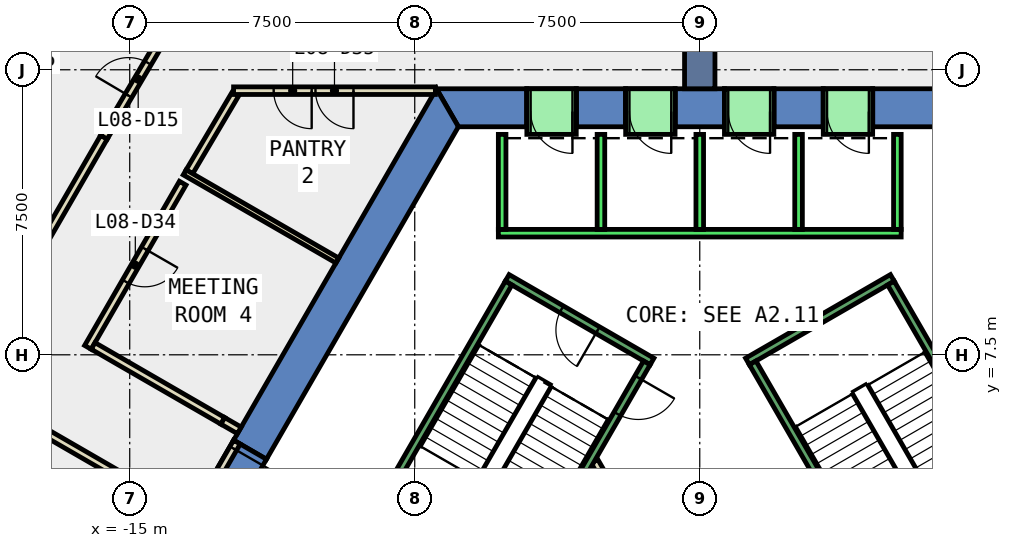
"""IFC4 building model, lengths in metres.
Left out: names, types, materials, properties, quantities, classifications, styles, units other than length and angle.
Written with IfcOpenShell. Run it as: python <this file> out.ifc"""

import sys

from ifc_helpers import new_model, si_unit, direction, frame, frame_2d, origin, place, context, subcontext, project, spatial, polyline, rectangle, outline, extrude, element, fill, save


model = new_model("IFC4")
c1 = context("Model", 3, precision=1e-05, world=origin(), true_north=direction((0.0, 1.0)))
c2 = subcontext(c1, "Body", "Model", "MODEL_VIEW")
j1 = project(units=[si_unit("LENGTHUNIT", "METRE"), si_unit("PLANEANGLEUNIT", "RADIAN")], contexts=[c1])
p1 = place(None, origin())
s1 = spatial("IfcSite", under=j1, at=p1, CompositionType="ELEMENT")
p2 = place(p1, origin())
s2 = spatial("IfcBuilding", under=s1, at=p2, CompositionType="ELEMENT")
p3 = place(p2, frame((0.0, 0.0, 43.4)))
s3 = spatial("IfcBuildingStorey", under=s2, at=p3, CompositionType="ELEMENT", Elevation=43.4)
p4 = place(p3, frame((0.0, 0.0, -0.4)))
e1 = element("IfcWall", 1, at=p4, inside=s3, PredefinedType="SHEAR", context=c2, shape_type="SweptSolid", body=[
    extrude(outline(polyline([(4.55, 14.5), (4.55, 13.5), (6.351, 13.5), (6.928, 14.5), (4.55, 14.5)])), origin(), (0.0, 0.0, 1.0), 4.2),
])
p5 = place(p3, frame((0.0, 0.0, -0.4)))
e2 = element("IfcWall", 2, at=p5, inside=s3, PredefinedType="SHEAR", context=c2, shape_type="SweptSolid", body=[
    extrude(outline(polyline([(1.95, 14.5), (1.95, 13.5), (3.25, 13.5), (3.25, 14.5), (1.95, 14.5)])), origin(), (0.0, 0.0, 1.0), 4.2),
])
p6 = place(p3, frame((0.0, 0.0, -0.4)))
e3 = element("IfcWall", 3, at=p6, inside=s3, PredefinedType="SHEAR", context=c2, shape_type="SweptSolid", body=[
    extrude(outline(polyline([(-0.65, 14.5), (-0.65, 13.5), (0.65, 13.5), (0.65, 14.5), (-0.65, 14.5)])), origin(), (0.0, 0.0, 1.0), 4.2),
])
p7 = place(p3, frame((0.0, 0.0, -0.4)))
e4 = element("IfcWall", 4, at=p7, inside=s3, PredefinedType="SHEAR", context=c2, shape_type="SweptSolid", body=[
    extrude(outline(polyline([(-3.25, 14.5), (-3.25, 13.5), (-1.95, 13.5), (-1.95, 14.5), (-3.25, 14.5)])), origin(), (0.0, 0.0, 1.0), 4.2),
])
p8 = place(p3, frame((0.0, 0.0, -0.4)))
e5 = element("IfcWall", 5, at=p8, inside=s3, PredefinedType="SHEAR", context=c2, shape_type="SweptSolid", body=[
    extrude(outline(polyline([(-4.55, 13.5), (-4.55, 14.5), (-6.928, 14.5), (-6.351, 13.5), (-4.55, 13.5)])), origin(), (0.0, 0.0, 1.0), 4.2),
])
p9 = place(p3, frame((0.0, 0.0, 3.6)))
e6 = element("IfcWall", 6, at=p9, inside=s3, PredefinedType="SHEAR", context=c2, shape_type="SweptSolid", body=[
    extrude(outline(polyline([(3.25, 14.5), (3.25, 13.5), (4.55, 13.5), (4.55, 14.5), (3.25, 14.5)])), origin(), (0.0, 0.0, 1.0), 0.2),
])
p10 = place(p3, frame((0.0, 0.0, 3.6)))
e7 = element("IfcWall", 7, at=p10, inside=s3, PredefinedType="SHEAR", context=c2, shape_type="SweptSolid", body=[
    extrude(outline(polyline([(0.65, 14.5), (0.65, 13.5), (1.95, 13.5), (1.95, 14.5), (0.65, 14.5)])), origin(), (0.0, 0.0, 1.0), 0.2),
])
p11 = place(p3, frame((0.0, 0.0, 3.6)))
e8 = element("IfcWall", 8, at=p11, inside=s3, PredefinedType="SHEAR", context=c2, shape_type="SweptSolid", body=[
    extrude(outline(polyline([(-1.95, 14.5), (-1.95, 13.5), (-0.65, 13.5), (-0.65, 14.5), (-1.95, 14.5)])), origin(), (0.0, 0.0, 1.0), 0.2),
])
p12 = place(p3, frame((0.0, 0.0, 3.6)))
e9 = element("IfcWall", 9, at=p12, inside=s3, PredefinedType="SHEAR", context=c2, shape_type="SweptSolid", body=[
    extrude(outline(polyline([(-4.55, 14.5), (-4.55, 13.5), (-3.25, 13.5), (-3.25, 14.5), (-4.55, 14.5)])), origin(), (0.0, 0.0, 1.0), 0.2),
])
p13 = place(p3, frame((0.0, 0.0, -0.4)))
e10 = element("IfcWall", 10, at=p13, inside=s3, PredefinedType="SHEAR", context=c2, shape_type="SweptSolid", body=[
    extrude(outline(polyline([(-12.267, 5.252), (-11.402, 4.752), (-6.351, 13.5), (-6.928, 14.5), (-12.267, 5.252)])), origin(), (0.0, 0.0, 1.0), 4.2),
])
p14 = place(p3, frame((0.0, 0.0, 3.6)))
e11 = element("IfcWall", 11, at=p14, inside=s3, PredefinedType="SHEAR", context=c2, shape_type="SweptSolid", body=[
    extrude(outline(polyline([(-13.267, 3.52), (-12.402, 3.02), (-11.402, 4.752), (-12.267, 5.252), (-13.267, 3.52)])), origin(), (0.0, 0.0, 1.0), 0.2),
])
p15 = place(p3, frame((0.0, 14.5, -0.4), z_axis=(0.0, 0.0, 1.0), x_axis=(0.0, 1.0, 0.0)))
e12 = element("IfcWall", 12, at=p15, inside=s3, PredefinedType="SHEAR", context=c2, shape_type="SweptSolid", body=[
    extrude(rectangle(XDim=9.0, YDim=0.8, at=frame_2d((4.5, 0.0))), origin(), (0.0, 0.0, 1.0), 4.2),
])
p16 = place(p3, frame((-13.606, 12.016, 0.0), z_axis=(0.0, 0.0, 1.0), x_axis=(-0.499992180995, -0.866029918042, 0.0)))
e13 = element("IfcWall", 13, at=p16, inside=s3, PredefinedType="PARTITIONING", context=c2, shape_type="SweptSolid", body=[
    extrude(rectangle(XDim=4.988, YDim=0.2, at=frame_2d((2.494, 0.0))), origin(), (0.0, 0.0, 1.0), 3.8),
])
p17 = place(p16, frame((1.994, 0.0, 0.0)))
e14 = element("IfcOpeningElement", 14, at=p17, cuts=e13, PredefinedType="OPENING", context=c2, shape_type="SweptSolid", body=[
    extrude(rectangle(XDim=1.0, YDim=2.1, at=frame_2d((0.5, 1.05))), frame((0.0, 0.11, 0.0), z_axis=(0.0, -1.0, 0.0), x_axis=(1.0, 0.0, 0.0)), (0.0, 0.0, 1.0), 0.22),
])
p18 = place(p3, frame((-15.963, 7.733, 0.0), z_axis=(0.0, 0.0, 1.0), x_axis=(0.865965832374, -0.500103166518, 0.0)))
e15 = element("IfcWall", 15, at=p18, inside=s3, PredefinedType="PARTITIONING", context=c2, shape_type="SweptSolid", body=[
    extrude(rectangle(XDim=3.941, YDim=0.2, at=frame_2d((1.971, 0.0))), origin(), (0.0, 0.0, 1.0), 3.8),
])
p19 = place(p3, frame((-12.218, 14.364, 0.0), z_axis=(0.0, 0.0, 1.0), x_axis=(-0.508767325294, -0.860904064756, 0.0)))
e16 = element("IfcWall", 16, at=p19, inside=s3, PredefinedType="PARTITIONING", context=c2, shape_type="SweptSolid", body=[
    extrude(rectangle(XDim=2.38, YDim=0.2, at=frame_2d((1.19, 0.0))), origin(), (0.0, 0.0, 1.0), 3.8),
])
p20 = place(p3, frame((-17.261, 5.48, 0.0), z_axis=(0.0, 0.0, 1.0), x_axis=(0.865949187497, -0.500131987253, 0.0)))
e17 = element("IfcWall", 17, at=p20, inside=s3, PredefinedType="PARTITIONING", context=c2, shape_type="SweptSolid", body=[
    extrude(rectangle(XDim=3.939, YDim=0.2, at=frame_2d((1.969, 0.0))), origin(), (0.0, 0.0, 1.0), 3.8),
])
p21 = place(p3, frame((-17.448, 10.16, 0.0), z_axis=(0.0, 0.0, 1.0), x_axis=(0.499951278228, 0.866053531485, 0.0)))
e18 = element("IfcWall", 18, at=p21, inside=s3, PredefinedType="PARTITIONING", context=c2, shape_type="SweptSolid", body=[
    extrude(rectangle(XDim=3.54, YDim=0.2, at=frame_2d((1.77, 0.0))), origin(), (0.0, 0.0, 1.0), 3.8),
])
p22 = place(p3, frame((-15.678, 13.226, 0.0), z_axis=(0.0, 0.0, 1.0), x_axis=(0.508613166028, 0.860995149431, 0.0)))
e19 = element("IfcWall", 19, at=p22, inside=s3, PredefinedType="PARTITIONING", context=c2, shape_type="SweptSolid", body=[
    extrude(rectangle(XDim=3.541, YDim=0.2, at=frame_2d((1.771, 0.0))), origin(), (0.0, 0.0, 1.0), 3.8),
])
p23 = place(p22, frame((1.271, 0.0, 0.0)))
e20 = element("IfcOpeningElement", 20, at=p23, cuts=e19, PredefinedType="OPENING", context=c2, shape_type="SweptSolid", body=[
    extrude(rectangle(XDim=1.0, YDim=2.1, at=frame_2d((0.5, 1.05))), frame((0.0, 0.11, 0.0), z_axis=(0.0, -1.0, 0.0), x_axis=(1.0, 0.0, 0.0)), (0.0, 0.0, 1.0), 0.22),
])
p24 = place(p3, frame((-13.554, 12.3, 0.0), z_axis=(0.0, 0.0, 1.0), x_axis=(0.866028685375, -0.499994316075, 0.0)))
e21 = element("IfcWall", 21, at=p24, inside=s3, PredefinedType="PARTITIONING", context=c2, shape_type="SweptSolid", body=[
    extrude(rectangle(XDim=4.638, YDim=0.15, at=frame_2d((2.319, 0.0))), origin(), (0.0, 0.0, 1.0), 3.8),
])
p25 = place(p3, frame((-6.957, 14.45, 0.0), z_axis=(0.0, 0.0, 1.0), x_axis=(-1.0, 0.0, 0.0)))
e22 = element("IfcWall", 22, at=p25, inside=s3, PredefinedType="PARTITIONING", context=c2, shape_type="SweptSolid", body=[
    extrude(rectangle(XDim=5.31, YDim=0.2, at=frame_2d((2.655, 0.0))), origin(), (0.0, 0.0, 1.0), 3.8),
])
p26 = place(p25, frame((2.155, 0.0, 0.0)))
e23 = element("IfcOpeningElement", 23, at=p26, cuts=e22, PredefinedType="OPENING", context=c2, shape_type="SweptSolid", body=[
    extrude(rectangle(XDim=1.0, YDim=2.1, at=frame_2d((0.5, 1.05))), frame((0.0, 0.11, 0.0), z_axis=(0.0, -1.0, 0.0), x_axis=(1.0, 0.0, 0.0)), (0.0, 0.0, 1.0), 0.22),
])
p27 = place(p25, frame((3.255, 0.0, 0.0)))
e24 = element("IfcOpeningElement", 24, at=p27, cuts=e22, PredefinedType="OPENING", context=c2, shape_type="SweptSolid", body=[
    extrude(rectangle(XDim=1.0, YDim=2.1, at=frame_2d((0.5, 1.05))), frame((0.0, 0.11, 0.0), z_axis=(0.0, -1.0, 0.0), x_axis=(1.0, 0.0, 0.0)), (0.0, 0.0, 1.0), 0.22),
])
p28 = place(p3, frame((-2.771, 4.7, 0.0), z_axis=(0.0, 0.0, 1.0), x_axis=(0.499969479948, -0.866043023828, 0.0)))
e25 = element("IfcWall", 25, at=p28, inside=s3, PredefinedType="PARTITIONING", context=c2, shape_type="SweptSolid", body=[
    extrude(rectangle(XDim=4.99, YDim=0.2, at=frame_2d((2.495, 0.0))), origin(), (0.0, 0.0, 1.0), 3.8),
])
p29 = place(p28, frame((1.945, 0.0, 0.0)))
e26 = element("IfcOpeningElement", 26, at=p29, cuts=e25, PredefinedType="OPENING", context=c2, shape_type="SweptSolid", body=[
    extrude(rectangle(XDim=1.0, YDim=2.1, at=frame_2d((0.5, 1.05))), frame((0.0, 0.11, 0.0), z_axis=(0.0, -1.0, 0.0), x_axis=(1.0, 0.0, 0.0)), (0.0, 0.0, 1.0), 0.22),
])
p30 = place(p3, frame((-12.18, 5.202, 0.0), z_axis=(0.0, 0.0, 1.0), x_axis=(-0.50002537861, -0.866010750942, 0.0)))
e27 = element("IfcWall", 27, at=p30, inside=s3, PredefinedType="PARTITIONING", context=c2, shape_type="SweptSolid", body=[
    extrude(rectangle(XDim=2.0, YDim=0.2, at=frame_2d((1.0, 0.0))), origin(), (0.0, 0.0, 1.0), 2.4),
])
p31 = place(p30, frame((0.19, 0.0, 0.0)))
e28 = element("IfcOpeningElement", 28, at=p31, cuts=e27, PredefinedType="OPENING", context=c2, shape_type="SweptSolid", body=[
    extrude(rectangle(XDim=1.8, YDim=2.1, at=frame_2d((0.9, 1.05))), frame((0.0, 0.11, 0.0), z_axis=(0.0, -1.0, 0.0), x_axis=(1.0, 0.0, 0.0)), (0.0, 0.0, 1.0), 0.22),
])
p32 = place(p3, frame((-12.55, 5.762, 0.0), z_axis=(0.0, 0.0, 1.0), x_axis=(0.866071776036, -0.499919672301, 0.0)))
e29 = element("IfcWall", 29, at=p32, inside=s3, PredefinedType="PARTITIONING", context=c2, shape_type="SweptSolid", body=[
    extrude(rectangle(XDim=0.5, YDim=0.2, at=frame_2d((0.25, 0.0))), origin(), (0.0, 0.0, 1.0), 2.4),
])
p33 = place(p3, frame((5.3, 10.7, 0.0), z_axis=(0.0, 0.0, 1.0), x_axis=(-1.0, 0.0, 0.0)))
e30 = element("IfcWall", 30, at=p33, inside=s3, PredefinedType="STANDARD", context=c2, shape_type="SweptSolid", body=[
    extrude(rectangle(XDim=10.6, YDim=0.2, at=frame_2d((5.3, 0.0))), origin(), (0.0, 0.0, 1.0), 3.8),
])
for number, where, z_axis, x_axis in (
    (31, (5.2, 10.8, 0.0), (0.0, 0.0, 1.0), (0.0, 1.0, 0.0)),
    (32, (2.6, 10.8, 0.0), (0.0, 0.0, 1.0), (0.0, 1.0, 0.0)),
    (33, (0.0, 10.8, 0.0), (0.0, 0.0, 1.0), (0.0, 1.0, 0.0)),
    (34, (-2.6, 10.8, 0.0), (0.0, 0.0, 1.0), (0.0, 1.0, 0.0)),
    (35, (-5.2, 10.8, 0.0), (0.0, 0.0, 1.0), (0.0, 1.0, 0.0)),
):
    element("IfcWall", number, at=place(p3, frame(where, z_axis=z_axis, x_axis=x_axis)), inside=s3, PredefinedType="STANDARD", context=c2, shape_type="SweptSolid", body=[
        extrude(rectangle(XDim=2.5, YDim=0.2, at=frame_2d((1.25, 0.0))), origin(), (0.0, 0.0, 1.0), 3.8),
    ])
p34 = place(p3, frame((4.55, 13.9, 0.0), z_axis=(0.0, 0.0, 1.0), x_axis=(-1.0, 0.0, 0.0)))
e36 = element("IfcWall", 36, at=p34, inside=s3, PredefinedType="STANDARD", context=c2, shape_type="SweptSolid", body=[
    extrude(rectangle(XDim=1.3, YDim=1.2, at=frame_2d((0.65, 0.0))), origin(), (0.0, 0.0, 1.0), 2.4),
])
p35 = place(p34, frame((0.1, 0.0, 0.0)))
e37 = element("IfcOpeningElement", 37, at=p35, cuts=e36, PredefinedType="OPENING", context=c2, shape_type="SweptSolid", body=[
    extrude(rectangle(XDim=1.1, YDim=2.3, at=frame_2d((0.55, 1.15))), frame((0.0, 0.61, 0.0), z_axis=(0.0, -1.0, 0.0), x_axis=(1.0, 0.0, 0.0)), (0.0, 0.0, 1.0), 1.22),
])
p36 = place(p3, frame((1.95, 13.9, 0.0), z_axis=(0.0, 0.0, 1.0), x_axis=(-1.0, 0.0, 0.0)))
e38 = element("IfcWall", 38, at=p36, inside=s3, PredefinedType="STANDARD", context=c2, shape_type="SweptSolid", body=[
    extrude(rectangle(XDim=1.3, YDim=1.2, at=frame_2d((0.65, 0.0))), origin(), (0.0, 0.0, 1.0), 2.4),
])
p37 = place(p36, frame((0.1, 0.0, 0.0)))
e39 = element("IfcOpeningElement", 39, at=p37, cuts=e38, PredefinedType="OPENING", context=c2, shape_type="SweptSolid", body=[
    extrude(rectangle(XDim=1.1, YDim=2.3, at=frame_2d((0.55, 1.15))), frame((0.0, 0.61, 0.0), z_axis=(0.0, -1.0, 0.0), x_axis=(1.0, 0.0, 0.0)), (0.0, 0.0, 1.0), 1.22),
])
p38 = place(p3, frame((-0.65, 13.9, 0.0), z_axis=(0.0, 0.0, 1.0), x_axis=(-1.0, 0.0, 0.0)))
e40 = element("IfcWall", 40, at=p38, inside=s3, PredefinedType="STANDARD", context=c2, shape_type="SweptSolid", body=[
    extrude(rectangle(XDim=1.3, YDim=1.2, at=frame_2d((0.65, 0.0))), origin(), (0.0, 0.0, 1.0), 2.4),
])
p39 = place(p38, frame((0.1, 0.0, 0.0)))
e41 = element("IfcOpeningElement", 41, at=p39, cuts=e40, PredefinedType="OPENING", context=c2, shape_type="SweptSolid", body=[
    extrude(rectangle(XDim=1.1, YDim=2.3, at=frame_2d((0.55, 1.15))), frame((0.0, 0.61, 0.0), z_axis=(0.0, -1.0, 0.0), x_axis=(1.0, 0.0, 0.0)), (0.0, 0.0, 1.0), 1.22),
])
p40 = place(p3, frame((-3.25, 13.9, 0.0), z_axis=(0.0, 0.0, 1.0), x_axis=(-1.0, 0.0, 0.0)))
e42 = element("IfcWall", 42, at=p40, inside=s3, PredefinedType="STANDARD", context=c2, shape_type="SweptSolid", body=[
    extrude(rectangle(XDim=1.3, YDim=1.2, at=frame_2d((0.65, 0.0))), origin(), (0.0, 0.0, 1.0), 2.4),
])
p41 = place(p40, frame((0.1, 0.0, 0.0)))
e43 = element("IfcOpeningElement", 43, at=p41, cuts=e42, PredefinedType="OPENING", context=c2, shape_type="SweptSolid", body=[
    extrude(rectangle(XDim=1.1, YDim=2.3, at=frame_2d((0.55, 1.15))), frame((0.0, 0.61, 0.0), z_axis=(0.0, -1.0, 0.0), x_axis=(1.0, 0.0, 0.0)), (0.0, 0.0, 1.0), 1.22),
])
p42 = place(p3, frame((1.256, 7.324, 0.0), z_axis=(0.0, 0.0, 1.0), x_axis=(0.866046073146, 0.499964197906, 0.0)))
e44 = element("IfcWall", 44, at=p42, inside=s3, PredefinedType="STANDARD", context=c2, shape_type="SweptSolid", body=[
    extrude(rectangle(XDim=4.4, YDim=0.2, at=frame_2d((2.2, 0.0))), origin(), (0.0, 0.0, 1.0), 3.8),
])
p43 = place(p3, frame((4.843, 1.312, 0.0), z_axis=(0.0, 0.0, 1.0), x_axis=(-0.499963383562, 0.866046543262, 0.0)))
e45 = element("IfcWall", 45, at=p43, inside=s3, PredefinedType="STANDARD", context=c2, shape_type="SweptSolid", body=[
    extrude(rectangle(XDim=6.9, YDim=0.2, at=frame_2d((3.45, 0.0))), origin(), (0.0, 0.0, 1.0), 3.8),
])
p44 = place(p43, frame((0.45, 0.0, 0.0)))
e46 = element("IfcOpeningElement", 46, at=p44, cuts=e45, PredefinedType="OPENING", context=c2, shape_type="SweptSolid", body=[
    extrude(rectangle(XDim=1.1, YDim=2.2, at=frame_2d((0.55, 1.1))), frame((0.0, 0.11, 0.0), z_axis=(0.0, -1.0, 0.0), x_axis=(1.0, 0.0, 0.0)), (0.0, 0.0, 1.0), 0.22),
])
p45 = place(p3, frame((8.48, 3.412, 0.0), z_axis=(0.0, 0.0, 1.0), x_axis=(-0.499978703459, 0.866037698999, 0.0)))
e47 = element("IfcWall", 47, at=p45, inside=s3, PredefinedType="STANDARD", context=c2, shape_type="SweptSolid", body=[
    extrude(rectangle(XDim=6.9, YDim=0.2, at=frame_2d((3.45, 0.0))), origin(), (0.0, 0.0, 1.0), 3.8),
])
p46 = place(p3, frame((-1.256, 7.324, 0.0), z_axis=(0.0, 0.0, 1.0), x_axis=(-0.866046073146, 0.499964197906, 0.0)))
e48 = element("IfcWall", 48, at=p46, inside=s3, PredefinedType="STANDARD", context=c2, shape_type="SweptSolid", body=[
    extrude(rectangle(XDim=4.4, YDim=0.2, at=frame_2d((2.2, 0.0))), origin(), (0.0, 0.0, 1.0), 3.8),
])
p47 = place(p46, frame((1.65, 0.0, 0.0)))
e49 = element("IfcOpeningElement", 49, at=p47, cuts=e48, PredefinedType="OPENING", context=c2, shape_type="SweptSolid", body=[
    extrude(rectangle(XDim=1.1, YDim=2.2, at=frame_2d((0.55, 1.1))), frame((0.0, 0.11, 0.0), z_axis=(0.0, -1.0, 0.0), x_axis=(1.0, 0.0, 0.0)), (0.0, 0.0, 1.0), 0.22),
])
p48 = place(p3, frame((-1.393, 7.288, 0.0), z_axis=(0.0, 0.0, 1.0), x_axis=(-0.499963383562, -0.866046543262, 0.0)))
e50 = element("IfcWall", 50, at=p48, inside=s3, PredefinedType="STANDARD", context=c2, shape_type="SweptSolid", body=[
    extrude(rectangle(XDim=6.9, YDim=0.2, at=frame_2d((3.45, 0.0))), origin(), (0.0, 0.0, 1.0), 3.8),
])
p49 = place(p48, frame((0.45, 0.0, 0.0)))
e51 = element("IfcOpeningElement", 51, at=p49, cuts=e50, PredefinedType="OPENING", context=c2, shape_type="SweptSolid", body=[
    extrude(rectangle(XDim=1.1, YDim=2.2, at=frame_2d((0.55, 1.1))), frame((0.0, 0.11, 0.0), z_axis=(0.0, -1.0, 0.0), x_axis=(1.0, 0.0, 0.0)), (0.0, 0.0, 1.0), 0.22),
])
p50 = place(p3, frame((-5.03, 9.388, 0.0), z_axis=(0.0, 0.0, 1.0), x_axis=(-0.499978703459, -0.866037698999, 0.0)))
e52 = element("IfcWall", 52, at=p50, inside=s3, PredefinedType="STANDARD", context=c2, shape_type="SweptSolid", body=[
    extrude(rectangle(XDim=6.9, YDim=0.2, at=frame_2d((3.45, 0.0))), origin(), (0.0, 0.0, 1.0), 3.8),
])
p51 = place(p23, origin())
e53 = element("IfcDoor", 53, at=p51, inside=s3, OperationType="SINGLE_SWING_LEFT", PredefinedType="DOOR", context=c2, shape_type="SweptSolid", body=[
    extrude(rectangle(XDim=1.0, YDim=2.1, at=frame_2d((0.5, 1.05))), frame((0.0, 0.025, 0.0), z_axis=(0.0, -1.0, 0.0), x_axis=(1.0, 0.0, 0.0)), (0.0, 0.0, 1.0), 0.05),
])
fill(e20, e53)
p52 = place(p17, origin())
e54 = element("IfcDoor", 54, at=p52, inside=s3, OperationType="SINGLE_SWING_LEFT", PredefinedType="DOOR", context=c2, shape_type="SweptSolid", body=[
    extrude(rectangle(XDim=1.0, YDim=2.1, at=frame_2d((0.5, 1.05))), frame((0.0, 0.025, 0.0), z_axis=(0.0, -1.0, 0.0), x_axis=(1.0, 0.0, 0.0)), (0.0, 0.0, 1.0), 0.05),
])
fill(e14, e54)
p53 = place(p26, origin())
e55 = element("IfcDoor", 55, at=p53, inside=s3, OperationType="SINGLE_SWING_LEFT", PredefinedType="DOOR", context=c2, shape_type="SweptSolid", body=[
    extrude(rectangle(XDim=1.0, YDim=2.1, at=frame_2d((0.5, 1.05))), frame((0.0, 0.025, 0.0), z_axis=(0.0, -1.0, 0.0), x_axis=(1.0, 0.0, 0.0)), (0.0, 0.0, 1.0), 0.05),
])
fill(e23, e55)
p54 = place(p27, origin())
e56 = element("IfcDoor", 56, at=p54, inside=s3, OperationType="SINGLE_SWING_RIGHT", PredefinedType="DOOR", context=c2, shape_type="SweptSolid", body=[
    extrude(rectangle(XDim=1.0, YDim=2.1, at=frame_2d((0.5, 1.05))), frame((0.0, 0.025, 0.0), z_axis=(0.0, -1.0, 0.0), x_axis=(1.0, 0.0, 0.0)), (0.0, 0.0, 1.0), 0.05),
])
fill(e24, e56)
p55 = place(p31, origin())
e57 = element("IfcDoor", 57, at=p55, inside=s3, OperationType="DOUBLE_DOOR_SINGLE_SWING", PredefinedType="DOOR", context=c2, shape_type="SweptSolid", body=[
    extrude(rectangle(XDim=1.8, YDim=2.1, at=frame_2d((0.9, 1.05))), frame((0.0, 0.025, 0.0), z_axis=(0.0, -1.0, 0.0), x_axis=(1.0, 0.0, 0.0)), (0.0, 0.0, 1.0), 0.05),
])
fill(e28, e57)
p56 = place(p35, origin())
e58 = element("IfcDoor", 58, at=p56, inside=s3, OperationType="SLIDING_TO_LEFT", PredefinedType="DOOR", context=c2, shape_type="SweptSolid", body=[
    extrude(rectangle(XDim=1.1, YDim=2.3, at=frame_2d((0.55, 1.15))), frame((0.0, 0.025, 0.0), z_axis=(0.0, -1.0, 0.0), x_axis=(1.0, 0.0, 0.0)), (0.0, 0.0, 1.0), 0.05),
])
fill(e37, e58)
p57 = place(p37, origin())
e59 = element("IfcDoor", 59, at=p57, inside=s3, OperationType="SLIDING_TO_LEFT", PredefinedType="DOOR", context=c2, shape_type="SweptSolid", body=[
    extrude(rectangle(XDim=1.1, YDim=2.3, at=frame_2d((0.55, 1.15))), frame((0.0, 0.025, 0.0), z_axis=(0.0, -1.0, 0.0), x_axis=(1.0, 0.0, 0.0)), (0.0, 0.0, 1.0), 0.05),
])
fill(e39, e59)
p58 = place(p39, origin())
e60 = element("IfcDoor", 60, at=p58, inside=s3, OperationType="SLIDING_TO_LEFT", PredefinedType="DOOR", context=c2, shape_type="SweptSolid", body=[
    extrude(rectangle(XDim=1.1, YDim=2.3, at=frame_2d((0.55, 1.15))), frame((0.0, 0.025, 0.0), z_axis=(0.0, -1.0, 0.0), x_axis=(1.0, 0.0, 0.0)), (0.0, 0.0, 1.0), 0.05),
])
fill(e41, e60)
p59 = place(p41, origin())
e61 = element("IfcDoor", 61, at=p59, inside=s3, OperationType="SLIDING_TO_LEFT", PredefinedType="DOOR", context=c2, shape_type="SweptSolid", body=[
    extrude(rectangle(XDim=1.1, YDim=2.3, at=frame_2d((0.55, 1.15))), frame((0.0, 0.025, 0.0), z_axis=(0.0, -1.0, 0.0), x_axis=(1.0, 0.0, 0.0)), (0.0, 0.0, 1.0), 0.05),
])
fill(e43, e61)
p60 = place(p49, origin())
e62 = element("IfcDoor", 62, at=p60, inside=s3, OperationType="SINGLE_SWING_LEFT", PredefinedType="DOOR", context=c2, shape_type="SweptSolid", body=[
    extrude(rectangle(XDim=1.1, YDim=2.2, at=frame_2d((0.55, 1.1))), frame((0.0, 0.025, 0.0), z_axis=(0.0, -1.0, 0.0), x_axis=(1.0, 0.0, 0.0)), (0.0, 0.0, 1.0), 0.05),
])
fill(e51, e62)
p61 = place(p47, origin())
e63 = element("IfcDoor", 63, at=p61, inside=s3, OperationType="SINGLE_SWING_LEFT", PredefinedType="DOOR", context=c2, shape_type="SweptSolid", body=[
    extrude(rectangle(XDim=1.1, YDim=2.2, at=frame_2d((0.55, 1.1))), frame((0.0, 0.025, 0.0), z_axis=(0.0, -1.0, 0.0), x_axis=(1.0, 0.0, 0.0)), (0.0, 0.0, 1.0), 0.05),
])
fill(e49, e63)
save(model, sys.argv[1])
